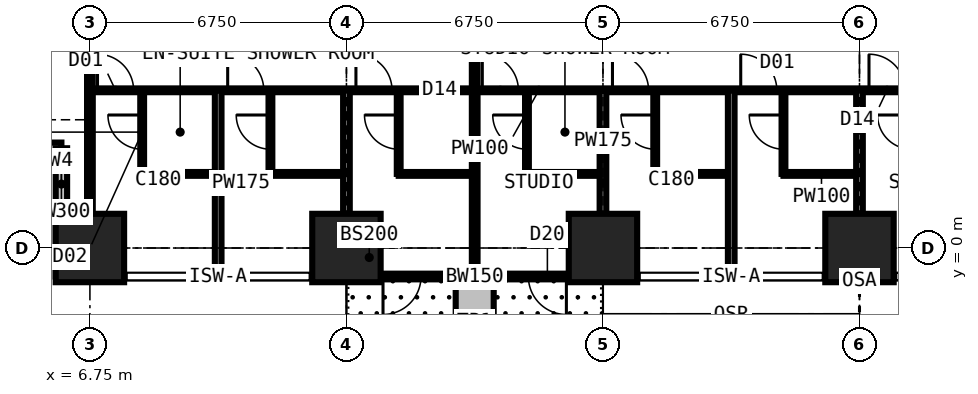
"""IFC4 building model, lengths in metres.
Left out: names, types, materials, properties, quantities, classifications, styles, units other than length and angle.
Written with IfcOpenShell. Run it as: python <this file> out.ifc"""

import sys

from ifc_helpers import new_model, si_unit, direction, frame, frame_2d, origin, origin_2d, place, context, subcontext, project, spatial, rectangle, extrude, element, fill, save


model = new_model("IFC4")
c1 = context("Model", 3, precision=1e-05, world=origin(), true_north=direction((0.0, 1.0)))
c2 = subcontext(c1, "Body", "Model", "MODEL_VIEW")
j1 = project(units=[si_unit("LENGTHUNIT", "METRE"), si_unit("PLANEANGLEUNIT", "RADIAN")], contexts=[c1])
p1 = place(None, origin())
s1 = spatial("IfcSite", under=j1, at=p1, CompositionType="ELEMENT")
p2 = place(p1, origin())
s2 = spatial("IfcBuilding", under=s1, at=p2, CompositionType="ELEMENT")
p3 = place(p2, frame((0.0, 0.0, 61.2)))
s3 = spatial("IfcBuildingStorey", under=s2, at=p3, CompositionType="ELEMENT", Elevation=61.2)
for number, where, z_axis, x_axis in (
    (1, (6.75, 0.0, 0.0), (0.0, 0.0, 1.0), (1.0, 0.0, 0.0)),
    (2, (13.5, 0.0, 0.0), (0.0, 0.0, 1.0), (1.0, 0.0, 0.0)),
    (3, (20.25, 0.0, 0.0), (0.0, 0.0, 1.0), (1.0, 0.0, 0.0)),
    (4, (27.0, 0.0, 0.0), (0.0, 0.0, 1.0), (1.0, 0.0, 0.0)),
):
    element("IfcColumn", number, at=place(p3, frame(where, z_axis=z_axis, x_axis=x_axis)), inside=s3, PredefinedType="COLUMN", context=c2, shape_type="SweptSolid", body=[
        extrude(rectangle(XDim=1.8, YDim=1.8, at=origin_2d()), origin(), (0.0, 0.0, 1.0), 3.6),
    ])
p4 = place(p3, frame((2.625, 2.625, 0.0), z_axis=(0.0, 0.0, 1.0), x_axis=(1.0, 0.0, 0.0)))
e5 = element("IfcWall", 5, at=p4, inside=s3, PredefinedType="SOLIDWALL", context=c2, shape_type="SweptSolid", body=[
    extrude(rectangle(XDim=3.375, YDim=0.3, at=frame_2d((1.688, 0.0))), origin(), (0.0, 0.0, 1.0), 3.375),
])
p5 = place(p4, frame((0.788, 0.0, 0.6)))
e6 = element("IfcOpeningElement", 6, at=p5, cuts=e5, PredefinedType="OPENING", context=c2, shape_type="SweptSolid", body=[
    extrude(rectangle(XDim=1.8, YDim=2.1, at=frame_2d((0.9, 1.05))), frame((0.0, 0.16, 0.0), z_axis=(0.0, -1.0, 0.0), x_axis=(1.0, 0.0, 0.0)), (0.0, 0.0, 1.0), 0.32),
])
p6 = place(p3, frame((6.0, 2.625, 0.0), z_axis=(0.0, 0.0, 1.0), x_axis=(0.0, -1.0, 0.0)))
e7 = element("IfcWall", 7, at=p6, inside=s3, PredefinedType="SOLIDWALL", context=c2, shape_type="SweptSolid", body=[
    extrude(rectangle(XDim=3.375, YDim=0.3, at=frame_2d((1.688, 0.0))), origin(), (0.0, 0.0, 1.0), 3.375),
])
p7 = place(p6, frame((0.343, 0.0, 0.9)))
e8 = element("IfcOpeningElement", 8, at=p7, cuts=e7, PredefinedType="OPENING", context=c2, shape_type="SweptSolid", body=[
    extrude(rectangle(XDim=1.2, YDim=1.8, at=frame_2d((0.6, 0.9))), frame((0.0, 0.16, 0.0), z_axis=(0.0, -1.0, 0.0), x_axis=(1.0, 0.0, 0.0)), (0.0, 0.0, 1.0), 0.32),
])
p8 = place(p3, frame((20.25, -0.75, 0.0), z_axis=(0.0, 0.0, 1.0), x_axis=(-1.0, 0.0, 0.0)))
e9 = element("IfcWall", 9, at=p8, inside=s3, PredefinedType="SOLIDWALL", context=c2, shape_type="SweptSolid", body=[
    extrude(rectangle(XDim=6.75, YDim=0.15, at=frame_2d((3.375, 0.0))), origin(), (0.0, 0.0, 1.0), 3.375),
])
p9 = place(p8, frame((0.962, 0.0, 0.0)))
e10 = element("IfcOpeningElement", 10, at=p9, cuts=e9, PredefinedType="OPENING", context=c2, shape_type="SweptSolid", body=[
    extrude(rectangle(XDim=1.0, YDim=2.2, at=frame_2d((0.5, 1.1))), frame((0.0, 0.085, 0.0), z_axis=(0.0, -1.0, 0.0), x_axis=(1.0, 0.0, 0.0)), (0.0, 0.0, 1.0), 0.17),
])
p10 = place(p8, frame((2.025, 0.0, 0.9)))
e11 = element("IfcOpeningElement", 11, at=p10, cuts=e9, PredefinedType="OPENING", context=c2, shape_type="SweptSolid", body=[
    extrude(rectangle(XDim=1.2, YDim=1.8, at=frame_2d((0.6, 0.9))), frame((0.0, 0.085, 0.0), z_axis=(0.0, -1.0, 0.0), x_axis=(1.0, 0.0, 0.0)), (0.0, 0.0, 1.0), 0.17),
])
p11 = place(p8, frame((4.788, 0.0, 0.0)))
e12 = element("IfcOpeningElement", 12, at=p11, cuts=e9, PredefinedType="OPENING", context=c2, shape_type="SweptSolid", body=[
    extrude(rectangle(XDim=1.0, YDim=2.2, at=frame_2d((0.5, 1.1))), frame((0.0, 0.085, 0.0), z_axis=(0.0, -1.0, 0.0), x_axis=(1.0, 0.0, 0.0)), (0.0, 0.0, 1.0), 0.17),
])
p12 = place(p8, frame((3.525, 0.0, 0.9)))
e13 = element("IfcOpeningElement", 13, at=p12, cuts=e9, PredefinedType="OPENING", context=c2, shape_type="SweptSolid", body=[
    extrude(rectangle(XDim=1.2, YDim=1.8, at=frame_2d((0.6, 0.9))), frame((0.0, 0.085, 0.0), z_axis=(0.0, -1.0, 0.0), x_axis=(1.0, 0.0, 0.0)), (0.0, 0.0, 1.0), 0.17),
])
p13 = place(p3, frame((16.875, -0.85, 0.0), z_axis=(0.0, 0.0, 1.0), x_axis=(0.0, -1.0, 0.0)))
e14 = element("IfcWall", 14, at=p13, inside=s3, PredefinedType="USERDEFINED", context=c2, shape_type="SweptSolid", body=[
    extrude(rectangle(XDim=2.2, YDim=1.0, at=frame_2d((1.1, 0.0))), origin(), (0.0, 0.0, 1.0), 0.9),
])
p14 = place(p3, frame((6.75, -0.734, 0.0), z_axis=(0.0, 0.0, 1.0), x_axis=(0.0, 1.0, 0.0)))
e15 = element("IfcWall", 15, at=p14, inside=s3, PredefinedType="PARTITIONING", context=c2, shape_type="SweptSolid", body=[
    extrude(rectangle(XDim=10.859, YDim=0.15, at=frame_2d((5.429, 0.0))), origin(), (0.0, 0.0, 1.0), 2.877),
])
p15 = place(p3, frame((6.75, 4.15, 0.0), z_axis=(0.0, 0.0, 1.0), x_axis=(1.0, 0.0, 0.0)))
e16 = element("IfcWall", 16, at=p15, inside=s3, PredefinedType="PARTITIONING", context=c2, shape_type="SweptSolid", body=[
    extrude(rectangle(XDim=23.625, YDim=0.1, at=frame_2d((11.812, 0.0))), origin(), (0.0, 0.0, 1.0), 3.375),
])
p16 = place(p15, frame((0.2, 0.0, 0.0)))
e17 = element("IfcOpeningElement", 17, at=p16, cuts=e16, PredefinedType="OPENING", context=c2, shape_type="SweptSolid", body=[
    extrude(rectangle(XDim=0.95, YDim=2.2, at=frame_2d((0.475, 1.1))), frame((0.0, 0.06, 0.0), z_axis=(0.0, -1.0, 0.0), x_axis=(1.0, 0.0, 0.0)), (0.0, 0.0, 1.0), 0.12),
])
p17 = place(p15, frame((3.625, 0.0, 0.0)))
e18 = element("IfcOpeningElement", 18, at=p17, cuts=e16, PredefinedType="OPENING", context=c2, shape_type="SweptSolid", body=[
    extrude(rectangle(XDim=0.95, YDim=2.2, at=frame_2d((0.475, 1.1))), frame((0.0, 0.06, 0.0), z_axis=(0.0, -1.0, 0.0), x_axis=(1.0, 0.0, 0.0)), (0.0, 0.0, 1.0), 0.12),
])
p18 = place(p15, frame((7.0, 0.0, 0.0)))
e19 = element("IfcOpeningElement", 19, at=p18, cuts=e16, PredefinedType="OPENING", context=c2, shape_type="SweptSolid", body=[
    extrude(rectangle(XDim=0.95, YDim=2.2, at=frame_2d((0.475, 1.1))), frame((0.0, 0.06, 0.0), z_axis=(0.0, -1.0, 0.0), x_axis=(1.0, 0.0, 0.0)), (0.0, 0.0, 1.0), 0.12),
])
p19 = place(p15, frame((10.325, 0.0, 0.0)))
e20 = element("IfcOpeningElement", 20, at=p19, cuts=e16, PredefinedType="OPENING", context=c2, shape_type="SweptSolid", body=[
    extrude(rectangle(XDim=0.95, YDim=2.2, at=frame_2d((0.475, 1.1))), frame((0.0, 0.06, 0.0), z_axis=(0.0, -1.0, 0.0), x_axis=(1.0, 0.0, 0.0)), (0.0, 0.0, 1.0), 0.12),
])
p20 = place(p15, frame((13.75, 0.0, 0.0)))
e21 = element("IfcOpeningElement", 21, at=p20, cuts=e16, PredefinedType="OPENING", context=c2, shape_type="SweptSolid", body=[
    extrude(rectangle(XDim=0.95, YDim=2.2, at=frame_2d((0.475, 1.1))), frame((0.0, 0.06, 0.0), z_axis=(0.0, -1.0, 0.0), x_axis=(1.0, 0.0, 0.0)), (0.0, 0.0, 1.0), 0.12),
])
p21 = place(p15, frame((17.125, 0.0, 0.0)))
e22 = element("IfcOpeningElement", 22, at=p21, cuts=e16, PredefinedType="OPENING", context=c2, shape_type="SweptSolid", body=[
    extrude(rectangle(XDim=0.95, YDim=2.2, at=frame_2d((0.475, 1.1))), frame((0.0, 0.06, 0.0), z_axis=(0.0, -1.0, 0.0), x_axis=(1.0, 0.0, 0.0)), (0.0, 0.0, 1.0), 0.12),
])
p22 = place(p15, frame((20.5, 0.0, 0.0)))
e23 = element("IfcOpeningElement", 23, at=p22, cuts=e16, PredefinedType="OPENING", context=c2, shape_type="SweptSolid", body=[
    extrude(rectangle(XDim=0.95, YDim=2.2, at=frame_2d((0.475, 1.1))), frame((0.0, 0.06, 0.0), z_axis=(0.0, -1.0, 0.0), x_axis=(1.0, 0.0, 0.0)), (0.0, 0.0, 1.0), 0.12),
])
p23 = place(p3, frame((8.125, 1.95, 0.0), z_axis=(0.0, 0.0, 1.0), x_axis=(0.0, 1.0, 0.0)))
e24 = element("IfcWall", 24, at=p23, inside=s3, PredefinedType="PARTITIONING", context=c2, shape_type="SweptSolid", body=[
    extrude(rectangle(XDim=2.2, YDim=0.1, at=frame_2d((1.1, 0.0))), origin(), (0.0, 0.0, 1.0), 3.375),
])
p24 = place(p23, frame((0.65, 0.0, 0.0)))
e25 = element("IfcOpeningElement", 25, at=p24, cuts=e24, PredefinedType="OPENING", context=c2, shape_type="SweptSolid", body=[
    extrude(rectangle(XDim=0.9, YDim=2.2, at=frame_2d((0.45, 1.1))), frame((0.0, 0.06, 0.0), z_axis=(0.0, -1.0, 0.0), x_axis=(1.0, 0.0, 0.0)), (0.0, 0.0, 1.0), 0.12),
])
p25 = place(p3, frame((8.125, 1.95, 0.0), z_axis=(0.0, 0.0, 1.0), x_axis=(1.0, 0.0, 0.0)))
e26 = element("IfcWall", 26, at=p25, inside=s3, PredefinedType="PARTITIONING", context=c2, shape_type="SweptSolid", body=[
    extrude(rectangle(XDim=2.0, YDim=0.1, at=frame_2d((1.0, 0.0))), origin(), (0.0, 0.0, 1.0), 3.375),
])
p26 = place(p3, frame((10.125, -0.734, 0.0), z_axis=(0.0, 0.0, 1.0), x_axis=(0.0, 1.0, 0.0)))
e27 = element("IfcWall", 27, at=p26, inside=s3, PredefinedType="PARTITIONING", context=c2, shape_type="SweptSolid", body=[
    extrude(rectangle(XDim=4.884, YDim=0.175, at=frame_2d((2.442, 0.0))), origin(), (0.0, 0.0, 1.0), 3.375),
])
p27 = place(p3, frame((11.5, 1.95, 0.0), z_axis=(0.0, 0.0, 1.0), x_axis=(0.0, 1.0, 0.0)))
e28 = element("IfcWall", 28, at=p27, inside=s3, PredefinedType="PARTITIONING", context=c2, shape_type="SweptSolid", body=[
    extrude(rectangle(XDim=2.2, YDim=0.1, at=frame_2d((1.1, 0.0))), origin(), (0.0, 0.0, 1.0), 3.375),
])
p28 = place(p27, frame((0.65, 0.0, 0.0)))
e29 = element("IfcOpeningElement", 29, at=p28, cuts=e28, PredefinedType="OPENING", context=c2, shape_type="SweptSolid", body=[
    extrude(rectangle(XDim=0.9, YDim=2.2, at=frame_2d((0.45, 1.1))), frame((0.0, 0.06, 0.0), z_axis=(0.0, -1.0, 0.0), x_axis=(1.0, 0.0, 0.0)), (0.0, 0.0, 1.0), 0.12),
])
p29 = place(p3, frame((11.5, 1.95, 0.0), z_axis=(0.0, 0.0, 1.0), x_axis=(1.0, 0.0, 0.0)))
e30 = element("IfcWall", 30, at=p29, inside=s3, PredefinedType="PARTITIONING", context=c2, shape_type="SweptSolid", body=[
    extrude(rectangle(XDim=2.0, YDim=0.1, at=frame_2d((1.0, 0.0))), origin(), (0.0, 0.0, 1.0), 3.375),
])
p30 = place(p3, frame((13.5, -0.734, 0.0), z_axis=(0.0, 0.0, 1.0), x_axis=(0.0, 1.0, 0.0)))
e31 = element("IfcWall", 31, at=p30, inside=s3, PredefinedType="PARTITIONING", context=c2, shape_type="SweptSolid", body=[
    extrude(rectangle(XDim=4.884, YDim=0.175, at=frame_2d((2.442, 0.0))), origin(), (0.0, 0.0, 1.0), 2.877),
])
p31 = place(p3, frame((14.875, 1.95, 0.0), z_axis=(0.0, 0.0, 1.0), x_axis=(0.0, 1.0, 0.0)))
e32 = element("IfcWall", 32, at=p31, inside=s3, PredefinedType="PARTITIONING", context=c2, shape_type="SweptSolid", body=[
    extrude(rectangle(XDim=2.2, YDim=0.1, at=frame_2d((1.1, 0.0))), origin(), (0.0, 0.0, 1.0), 3.375),
])
p32 = place(p31, frame((0.65, 0.0, 0.0)))
e33 = element("IfcOpeningElement", 33, at=p32, cuts=e32, PredefinedType="OPENING", context=c2, shape_type="SweptSolid", body=[
    extrude(rectangle(XDim=0.9, YDim=2.2, at=frame_2d((0.45, 1.1))), frame((0.0, 0.06, 0.0), z_axis=(0.0, -1.0, 0.0), x_axis=(1.0, 0.0, 0.0)), (0.0, 0.0, 1.0), 0.12),
])
p33 = place(p3, frame((14.875, 1.95, 0.0), z_axis=(0.0, 0.0, 1.0), x_axis=(1.0, 0.0, 0.0)))
e34 = element("IfcWall", 34, at=p33, inside=s3, PredefinedType="PARTITIONING", context=c2, shape_type="SweptSolid", body=[
    extrude(rectangle(XDim=2.0, YDim=0.1, at=frame_2d((1.0, 0.0))), origin(), (0.0, 0.0, 1.0), 3.375),
])
p34 = place(p3, frame((16.875, -0.734, 0.0), z_axis=(0.0, 0.0, 1.0), x_axis=(0.0, 1.0, 0.0)))
e35 = element("IfcWall", 35, at=p34, inside=s3, PredefinedType="PARTITIONING", context=c2, shape_type="SweptSolid", body=[
    extrude(rectangle(XDim=12.034, YDim=0.15, at=frame_2d((6.017, 0.0))), origin(), (0.0, 0.0, 1.0), 3.375),
])
p35 = place(p3, frame((18.25, 1.95, 0.0), z_axis=(0.0, 0.0, 1.0), x_axis=(0.0, 1.0, 0.0)))
e36 = element("IfcWall", 36, at=p35, inside=s3, PredefinedType="PARTITIONING", context=c2, shape_type="SweptSolid", body=[
    extrude(rectangle(XDim=2.2, YDim=0.1, at=frame_2d((1.1, 0.0))), origin(), (0.0, 0.0, 1.0), 3.375),
])
p36 = place(p35, frame((0.65, 0.0, 0.0)))
e37 = element("IfcOpeningElement", 37, at=p36, cuts=e36, PredefinedType="OPENING", context=c2, shape_type="SweptSolid", body=[
    extrude(rectangle(XDim=0.9, YDim=2.2, at=frame_2d((0.45, 1.1))), frame((0.0, 0.06, 0.0), z_axis=(0.0, -1.0, 0.0), x_axis=(1.0, 0.0, 0.0)), (0.0, 0.0, 1.0), 0.12),
])
p37 = place(p3, frame((18.25, 1.95, 0.0), z_axis=(0.0, 0.0, 1.0), x_axis=(1.0, 0.0, 0.0)))
e38 = element("IfcWall", 38, at=p37, inside=s3, PredefinedType="PARTITIONING", context=c2, shape_type="SweptSolid", body=[
    extrude(rectangle(XDim=2.0, YDim=0.1, at=frame_2d((1.0, 0.0))), origin(), (0.0, 0.0, 1.0), 3.375),
])
p38 = place(p3, frame((20.25, -0.734, 0.0), z_axis=(0.0, 0.0, 1.0), x_axis=(0.0, 1.0, 0.0)))
e39 = element("IfcWall", 39, at=p38, inside=s3, PredefinedType="PARTITIONING", context=c2, shape_type="SweptSolid", body=[
    extrude(rectangle(XDim=4.884, YDim=0.175, at=frame_2d((2.442, 0.0))), origin(), (0.0, 0.0, 1.0), 2.61),
])
p39 = place(p3, frame((21.625, 1.95, 0.0), z_axis=(0.0, 0.0, 1.0), x_axis=(0.0, 1.0, 0.0)))
e40 = element("IfcWall", 40, at=p39, inside=s3, PredefinedType="PARTITIONING", context=c2, shape_type="SweptSolid", body=[
    extrude(rectangle(XDim=2.2, YDim=0.1, at=frame_2d((1.1, 0.0))), origin(), (0.0, 0.0, 1.0), 3.375),
])
p40 = place(p39, frame((0.65, 0.0, 0.0)))
e41 = element("IfcOpeningElement", 41, at=p40, cuts=e40, PredefinedType="OPENING", context=c2, shape_type="SweptSolid", body=[
    extrude(rectangle(XDim=0.9, YDim=2.2, at=frame_2d((0.45, 1.1))), frame((0.0, 0.06, 0.0), z_axis=(0.0, -1.0, 0.0), x_axis=(1.0, 0.0, 0.0)), (0.0, 0.0, 1.0), 0.12),
])
p41 = place(p3, frame((21.625, 1.95, 0.0), z_axis=(0.0, 0.0, 1.0), x_axis=(1.0, 0.0, 0.0)))
e42 = element("IfcWall", 42, at=p41, inside=s3, PredefinedType="PARTITIONING", context=c2, shape_type="SweptSolid", body=[
    extrude(rectangle(XDim=2.0, YDim=0.1, at=frame_2d((1.0, 0.0))), origin(), (0.0, 0.0, 1.0), 3.375),
])
p42 = place(p3, frame((23.625, -0.734, 0.0), z_axis=(0.0, 0.0, 1.0), x_axis=(0.0, 1.0, 0.0)))
e43 = element("IfcWall", 43, at=p42, inside=s3, PredefinedType="PARTITIONING", context=c2, shape_type="SweptSolid", body=[
    extrude(rectangle(XDim=4.884, YDim=0.175, at=frame_2d((2.442, 0.0))), origin(), (0.0, 0.0, 1.0), 3.375),
])
p43 = place(p3, frame((25.0, 1.95, 0.0), z_axis=(0.0, 0.0, 1.0), x_axis=(0.0, 1.0, 0.0)))
e44 = element("IfcWall", 44, at=p43, inside=s3, PredefinedType="PARTITIONING", context=c2, shape_type="SweptSolid", body=[
    extrude(rectangle(XDim=2.2, YDim=0.1, at=frame_2d((1.1, 0.0))), origin(), (0.0, 0.0, 1.0), 3.375),
])
p44 = place(p43, frame((0.65, 0.0, 0.0)))
e45 = element("IfcOpeningElement", 45, at=p44, cuts=e44, PredefinedType="OPENING", context=c2, shape_type="SweptSolid", body=[
    extrude(rectangle(XDim=0.9, YDim=2.2, at=frame_2d((0.45, 1.1))), frame((0.0, 0.06, 0.0), z_axis=(0.0, -1.0, 0.0), x_axis=(1.0, 0.0, 0.0)), (0.0, 0.0, 1.0), 0.12),
])
p45 = place(p3, frame((25.0, 1.95, 0.0), z_axis=(0.0, 0.0, 1.0), x_axis=(1.0, 0.0, 0.0)))
e46 = element("IfcWall", 46, at=p45, inside=s3, PredefinedType="PARTITIONING", context=c2, shape_type="SweptSolid", body=[
    extrude(rectangle(XDim=2.0, YDim=0.1, at=frame_2d((1.0, 0.0))), origin(), (0.0, 0.0, 1.0), 3.375),
])
p46 = place(p3, frame((27.0, -0.734, 0.0), z_axis=(0.0, 0.0, 1.0), x_axis=(0.0, 1.0, 0.0)))
e47 = element("IfcWall", 47, at=p46, inside=s3, PredefinedType="PARTITIONING", context=c2, shape_type="SweptSolid", body=[
    extrude(rectangle(XDim=4.884, YDim=0.175, at=frame_2d((2.442, 0.0))), origin(), (0.0, 0.0, 1.0), 2.61),
])
p47 = place(p7, origin())
e48 = element("IfcWindow", 48, at=p47, inside=s3, PartitioningType="SINGLE_PANEL", PredefinedType="WINDOW", context=c2, shape_type="SweptSolid", body=[
    extrude(rectangle(XDim=1.2, YDim=1.8, at=frame_2d((0.6, 0.9))), frame((0.0, 0.03, 0.0), z_axis=(0.0, -1.0, 0.0), x_axis=(1.0, 0.0, 0.0)), (0.0, 0.0, 1.0), 0.06),
])
fill(e8, e48)
p48 = place(p9, origin())
e49 = element("IfcDoor", 49, at=p48, inside=s3, OperationType="SINGLE_SWING_LEFT", PredefinedType="DOOR", context=c2, shape_type="SweptSolid", body=[
    extrude(rectangle(XDim=1.0, YDim=2.2, at=frame_2d((0.5, 1.1))), frame((0.0, 0.025, 0.0), z_axis=(0.0, -1.0, 0.0), x_axis=(1.0, 0.0, 0.0)), (0.0, 0.0, 1.0), 0.05),
])
fill(e10, e49)
p49 = place(p10, origin())
e50 = element("IfcWindow", 50, at=p49, inside=s3, PartitioningType="SINGLE_PANEL", PredefinedType="WINDOW", context=c2, shape_type="SweptSolid", body=[
    extrude(rectangle(XDim=1.2, YDim=1.8, at=frame_2d((0.6, 0.9))), frame((0.0, 0.03, 0.0), z_axis=(0.0, -1.0, 0.0), x_axis=(1.0, 0.0, 0.0)), (0.0, 0.0, 1.0), 0.06),
])
fill(e11, e50)
p50 = place(p11, origin())
e51 = element("IfcDoor", 51, at=p50, inside=s3, OperationType="SINGLE_SWING_RIGHT", PredefinedType="DOOR", context=c2, shape_type="SweptSolid", body=[
    extrude(rectangle(XDim=1.0, YDim=2.2, at=frame_2d((0.5, 1.1))), frame((0.0, 0.025, 0.0), z_axis=(0.0, -1.0, 0.0), x_axis=(1.0, 0.0, 0.0)), (0.0, 0.0, 1.0), 0.05),
])
fill(e12, e51)
p51 = place(p12, origin())
e52 = element("IfcWindow", 52, at=p51, inside=s3, PartitioningType="SINGLE_PANEL", PredefinedType="WINDOW", context=c2, shape_type="SweptSolid", body=[
    extrude(rectangle(XDim=1.2, YDim=1.8, at=frame_2d((0.6, 0.9))), frame((0.0, 0.03, 0.0), z_axis=(0.0, -1.0, 0.0), x_axis=(1.0, 0.0, 0.0)), (0.0, 0.0, 1.0), 0.06),
])
fill(e13, e52)
p52 = place(p16, origin())
e53 = element("IfcDoor", 53, at=p52, inside=s3, OperationType="SINGLE_SWING_LEFT", PredefinedType="DOOR", context=c2, shape_type="SweptSolid", body=[
    extrude(rectangle(XDim=0.95, YDim=2.2, at=frame_2d((0.475, 1.1))), frame((0.0, 0.025, 0.0), z_axis=(0.0, -1.0, 0.0), x_axis=(1.0, 0.0, 0.0)), (0.0, 0.0, 1.0), 0.05),
])
fill(e17, e53)
p53 = place(p24, origin())
e54 = element("IfcDoor", 54, at=p53, inside=s3, OperationType="SINGLE_SWING_RIGHT", PredefinedType="DOOR", context=c2, shape_type="SweptSolid", body=[
    extrude(rectangle(XDim=0.9, YDim=2.2, at=frame_2d((0.45, 1.1))), frame((0.0, 0.025, 0.0), z_axis=(0.0, -1.0, 0.0), x_axis=(1.0, 0.0, 0.0)), (0.0, 0.0, 1.0), 0.05),
])
fill(e25, e54)
p54 = place(p17, origin())
e55 = element("IfcDoor", 55, at=p54, inside=s3, OperationType="SINGLE_SWING_LEFT", PredefinedType="DOOR", context=c2, shape_type="SweptSolid", body=[
    extrude(rectangle(XDim=0.95, YDim=2.2, at=frame_2d((0.475, 1.1))), frame((0.0, 0.025, 0.0), z_axis=(0.0, -1.0, 0.0), x_axis=(1.0, 0.0, 0.0)), (0.0, 0.0, 1.0), 0.05),
])
fill(e18, e55)
p55 = place(p28, origin())
e56 = element("IfcDoor", 56, at=p55, inside=s3, OperationType="SINGLE_SWING_RIGHT", PredefinedType="DOOR", context=c2, shape_type="SweptSolid", body=[
    extrude(rectangle(XDim=0.9, YDim=2.2, at=frame_2d((0.45, 1.1))), frame((0.0, 0.025, 0.0), z_axis=(0.0, -1.0, 0.0), x_axis=(1.0, 0.0, 0.0)), (0.0, 0.0, 1.0), 0.05),
])
fill(e29, e56)
p56 = place(p18, origin())
e57 = element("IfcDoor", 57, at=p56, inside=s3, OperationType="SINGLE_SWING_LEFT", PredefinedType="DOOR", context=c2, shape_type="SweptSolid", body=[
    extrude(rectangle(XDim=0.95, YDim=2.2, at=frame_2d((0.475, 1.1))), frame((0.0, 0.025, 0.0), z_axis=(0.0, -1.0, 0.0), x_axis=(1.0, 0.0, 0.0)), (0.0, 0.0, 1.0), 0.05),
])
fill(e19, e57)
p57 = place(p32, origin())
e58 = element("IfcDoor", 58, at=p57, inside=s3, OperationType="SINGLE_SWING_RIGHT", PredefinedType="DOOR", context=c2, shape_type="SweptSolid", body=[
    extrude(rectangle(XDim=0.9, YDim=2.2, at=frame_2d((0.45, 1.1))), frame((0.0, 0.025, 0.0), z_axis=(0.0, -1.0, 0.0), x_axis=(1.0, 0.0, 0.0)), (0.0, 0.0, 1.0), 0.05),
])
fill(e33, e58)
p58 = place(p19, origin())
e59 = element("IfcDoor", 59, at=p58, inside=s3, OperationType="SINGLE_SWING_LEFT", PredefinedType="DOOR", context=c2, shape_type="SweptSolid", body=[
    extrude(rectangle(XDim=0.95, YDim=2.2, at=frame_2d((0.475, 1.1))), frame((0.0, 0.025, 0.0), z_axis=(0.0, -1.0, 0.0), x_axis=(1.0, 0.0, 0.0)), (0.0, 0.0, 1.0), 0.05),
])
fill(e20, e59)
p59 = place(p36, origin())
e60 = element("IfcDoor", 60, at=p59, inside=s3, OperationType="SINGLE_SWING_RIGHT", PredefinedType="DOOR", context=c2, shape_type="SweptSolid", body=[
    extrude(rectangle(XDim=0.9, YDim=2.2, at=frame_2d((0.45, 1.1))), frame((0.0, 0.025, 0.0), z_axis=(0.0, -1.0, 0.0), x_axis=(1.0, 0.0, 0.0)), (0.0, 0.0, 1.0), 0.05),
])
fill(e37, e60)
p60 = place(p20, origin())
e61 = element("IfcDoor", 61, at=p60, inside=s3, OperationType="SINGLE_SWING_LEFT", PredefinedType="DOOR", context=c2, shape_type="SweptSolid", body=[
    extrude(rectangle(XDim=0.95, YDim=2.2, at=frame_2d((0.475, 1.1))), frame((0.0, 0.025, 0.0), z_axis=(0.0, -1.0, 0.0), x_axis=(1.0, 0.0, 0.0)), (0.0, 0.0, 1.0), 0.05),
])
fill(e21, e61)
p61 = place(p40, origin())
e62 = element("IfcDoor", 62, at=p61, inside=s3, OperationType="SINGLE_SWING_RIGHT", PredefinedType="DOOR", context=c2, shape_type="SweptSolid", body=[
    extrude(rectangle(XDim=0.9, YDim=2.2, at=frame_2d((0.45, 1.1))), frame((0.0, 0.025, 0.0), z_axis=(0.0, -1.0, 0.0), x_axis=(1.0, 0.0, 0.0)), (0.0, 0.0, 1.0), 0.05),
])
fill(e41, e62)
p62 = place(p21, origin())
e63 = element("IfcDoor", 63, at=p62, inside=s3, OperationType="SINGLE_SWING_LEFT", PredefinedType="DOOR", context=c2, shape_type="SweptSolid", body=[
    extrude(rectangle(XDim=0.95, YDim=2.2, at=frame_2d((0.475, 1.1))), frame((0.0, 0.025, 0.0), z_axis=(0.0, -1.0, 0.0), x_axis=(1.0, 0.0, 0.0)), (0.0, 0.0, 1.0), 0.05),
])
fill(e22, e63)
p63 = place(p44, origin())
e64 = element("IfcDoor", 64, at=p63, inside=s3, OperationType="SINGLE_SWING_RIGHT", PredefinedType="DOOR", context=c2, shape_type="SweptSolid", body=[
    extrude(rectangle(XDim=0.9, YDim=2.2, at=frame_2d((0.45, 1.1))), frame((0.0, 0.025, 0.0), z_axis=(0.0, -1.0, 0.0), x_axis=(1.0, 0.0, 0.0)), (0.0, 0.0, 1.0), 0.05),
])
fill(e45, e64)
p64 = place(p22, origin())
e65 = element("IfcDoor", 65, at=p64, inside=s3, OperationType="SINGLE_SWING_LEFT", PredefinedType="DOOR", context=c2, shape_type="SweptSolid", body=[
    extrude(rectangle(XDim=0.95, YDim=2.2, at=frame_2d((0.475, 1.1))), frame((0.0, 0.025, 0.0), z_axis=(0.0, -1.0, 0.0), x_axis=(1.0, 0.0, 0.0)), (0.0, 0.0, 1.0), 0.05),
])
fill(e23, e65)
save(model, sys.argv[1])
